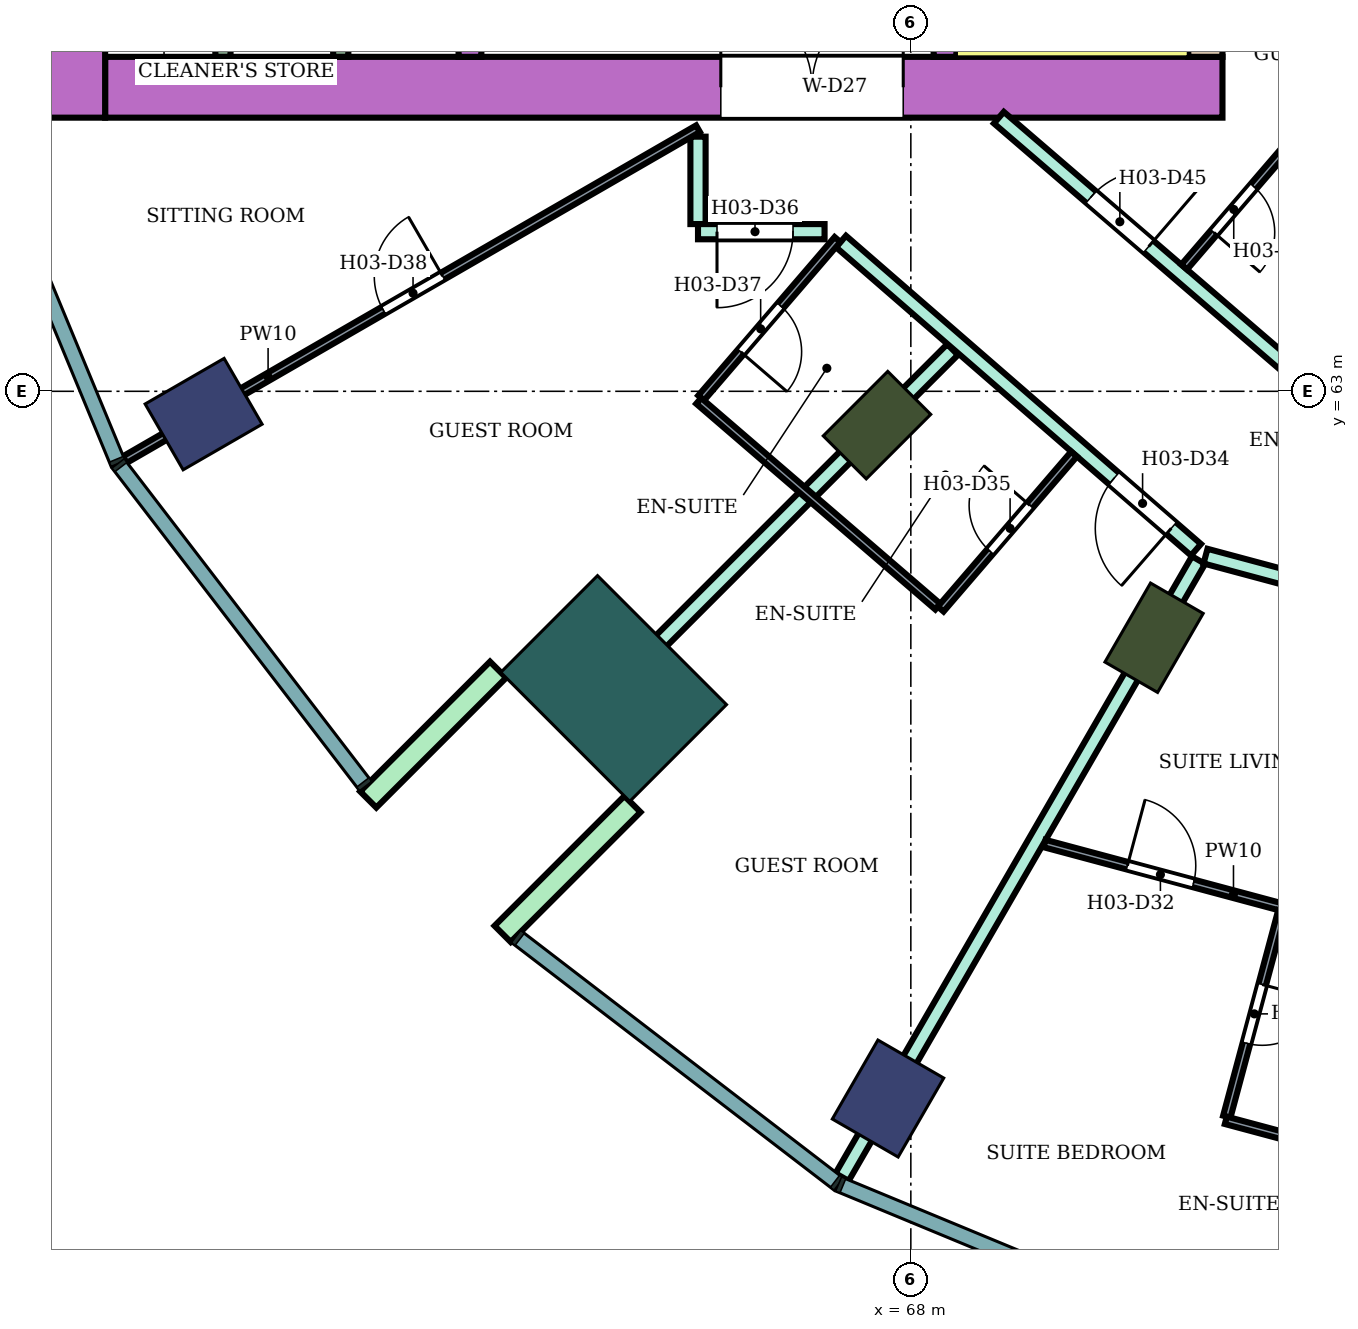
"""IFC4 building model, lengths in metres.
Left out: names, types, materials, properties, quantities, classifications, styles, units other than length and angle.
Written with IfcOpenShell. Run it as: python <this file> out.ifc"""

import sys

from ifc_helpers import new_model, si_unit, direction, frame, frame_2d, origin, origin_2d, place, context, subcontext, project, spatial, rectangle, extrude, element, fill, save


model = new_model("IFC4")
c1 = context("Model", 3, precision=1e-05, world=origin(), true_north=direction((0.0, 1.0)))
c2 = subcontext(c1, "Body", "Model", "MODEL_VIEW")
j1 = project(units=[si_unit("LENGTHUNIT", "METRE"), si_unit("PLANEANGLEUNIT", "RADIAN")], contexts=[c1])
p1 = place(None, origin())
s1 = spatial("IfcSite", under=j1, at=p1, CompositionType="ELEMENT")
p2 = place(p1, origin())
s2 = spatial("IfcBuilding", under=s1, at=p2, CompositionType="ELEMENT")
p3 = place(p2, frame((0.0, 0.0, 55.4)))
s3 = spatial("IfcBuildingStorey", under=s2, at=p3, CompositionType="ELEMENT", Elevation=55.4)
for number, where, z_axis, x_axis in (
    (1, (58.696, 62.7, 0.0), (0.0, 0.0, 1.0), (-0.866, -0.5, 0.0)),
    (2, (67.7, 53.696, 0.0), (0.0, 0.0, 1.0), (-0.5, -0.866, 0.0)),
):
    element("IfcColumn", number, at=place(p3, frame(where, z_axis=z_axis, x_axis=x_axis)), inside=s3, PredefinedType="COLUMN", context=c2, shape_type="SweptSolid", body=[
        extrude(rectangle(XDim=1.2, YDim=1.0, at=origin_2d()), origin(), (0.0, 0.0, 1.0), 3.8),
    ])
for number, where, z_axis, x_axis in (
    (3, (67.555, 62.555, 0.0), (0.0, 0.0, 1.0), (-0.707, -0.707, 0.0)),
    (4, (71.2, 59.758, 0.0), (0.0, 0.0, 1.0), (-0.5, -0.866, 0.0)),
):
    element("IfcColumn", number, at=place(p3, frame(where, z_axis=z_axis, x_axis=x_axis)), inside=s3, PredefinedType="COLUMN", context=c2, shape_type="SweptSolid", body=[
        extrude(rectangle(XDim=1.2, YDim=0.8, at=origin_2d()), origin(), (0.0, 0.0, 1.0), 3.8),
    ])
p4 = place(p3, frame((64.09, 59.09, 0.0), z_axis=(0.0, 0.0, 1.0), x_axis=(-0.707106781187, -0.707106781187, 0.0)))
e5 = element("IfcColumn", 5, at=p4, inside=s3, PredefinedType="COLUMN", context=c2, shape_type="SweptSolid", body=[
    extrude(rectangle(XDim=1.8, YDim=2.4, at=origin_2d()), origin(), (0.0, 0.0, 1.0), 3.8),
])
p5 = place(p3, frame((72.1, 67.0, 0.0), z_axis=(0.0, 0.0, 1.0), x_axis=(-1.0, 0.0, 0.0)))
e6 = element("IfcWall", 6, at=p5, inside=s3, PredefinedType="SHEAR", context=c2, shape_type="SweptSolid", body=[
    extrude(rectangle(XDim=14.7, YDim=0.8, at=frame_2d((7.35, 0.0))), origin(), (0.0, 0.0, 1.0), 3.48),
])
p6 = place(p5, frame((4.2, 0.0, 0.0)))
e7 = element("IfcOpeningElement", 7, at=p6, cuts=e6, PredefinedType="OPENING", context=c2, shape_type="SweptSolid", body=[
    extrude(rectangle(XDim=2.4, YDim=2.4, at=frame_2d((1.2, 1.2))), frame((0.0, 0.41, 0.0), z_axis=(0.0, -1.0, 0.0), x_axis=(1.0, 0.0, 0.0)), (0.0, 0.0, 1.0), 0.82),
])
p7 = place(p3, frame((71.875, 75.0, 0.0), z_axis=(0.0, 0.0, 1.0), x_axis=(0.0, -1.0, 0.0)))
e8 = element("IfcWall", 8, at=p7, inside=s3, PredefinedType="SHEAR", context=c2, shape_type="SweptSolid", body=[
    extrude(rectangle(XDim=7.6, YDim=0.45, at=frame_2d((3.8, 0.0))), origin(), (0.0, 0.0, 1.0), 3.48),
])
p8 = place(p3, frame((57.0, 83.4, 0.0), z_axis=(0.0, 0.0, 1.0), x_axis=(0.0, -1.0, 0.0)))
e9 = element("IfcWall", 9, at=p8, inside=s3, PredefinedType="SHEAR", context=c2, shape_type="SweptSolid", body=[
    extrude(rectangle(XDim=16.8, YDim=0.8, at=frame_2d((8.4, 0.0))), origin(), (0.0, 0.0, 1.0), 3.48),
])
p9 = place(p3, frame((68.45, 75.0, 0.0), z_axis=(0.0, 0.0, 1.0), x_axis=(0.0, -1.0, 0.0)))
e10 = element("IfcWall", 10, at=p9, inside=s3, PredefinedType="SHEAR", context=c2, shape_type="SweptSolid", body=[
    extrude(rectangle(XDim=7.6, YDim=0.3, at=frame_2d((3.8, 0.0))), origin(), (0.0, 0.0, 1.0), 3.48),
])
p10 = place(p9, frame((1.85, 0.0, 0.0)))
e11 = element("IfcOpeningElement", 11, at=p10, cuts=e10, PredefinedType="OPENING", context=c2, shape_type="SweptSolid", body=[
    extrude(rectangle(XDim=0.9, YDim=2.1, at=frame_2d((0.45, 1.05))), frame((0.0, 0.16, 0.0), z_axis=(0.0, -1.0, 0.0), x_axis=(1.0, 0.0, 0.0)), (0.0, 0.0, 1.0), 0.32),
])
p11 = place(p3, frame((62.2, 70.45, 0.0), z_axis=(0.0, 0.0, 1.0), x_axis=(0.0, -1.0, 0.0)))
e12 = element("IfcWall", 12, at=p11, inside=s3, PredefinedType="SHEAR", context=c2, shape_type="SweptSolid", body=[
    extrude(rectangle(XDim=3.05, YDim=0.3, at=frame_2d((1.525, 0.0))), origin(), (0.0, 0.0, 1.0), 3.48),
])
for number, where, z_axis, x_axis in (
    (13, (62.57, 59.338, 0.0), (0.0, 0.0, 1.0), (-0.707, -0.707, 0.0)),
    (14, (64.338, 57.57, 0.0), (0.0, 0.0, 1.0), (-0.707, -0.707, 0.0)),
):
    element("IfcWall", number, at=place(p3, frame(where, z_axis=z_axis, x_axis=x_axis)), inside=s3, PredefinedType="NOTDEFINED", context=c2, shape_type="SweptSolid", body=[
        extrude(rectangle(XDim=2.416, YDim=0.3, at=frame_2d((1.208, 0.0))), origin(), (0.0, 0.0, 1.0), 3.8),
    ])
p12 = place(p3, frame((63.596, 58.596, 0.0), z_axis=(0.0, 0.0, 1.0), x_axis=(0.707106781187, 0.707106781187, 0.0)))
e15 = element("IfcWall", 15, at=p12, inside=s3, PredefinedType="PARTITIONING", context=c2, shape_type="SweptSolid", body=[
    extrude(rectangle(XDim=7.005, YDim=0.2, at=frame_2d((3.503, 0.0))), origin(), (0.0, 0.0, 1.0), 3.35),
])
p13 = place(p3, frame((65.2, 65.2, 0.0), z_axis=(0.0, 0.0, 1.0), x_axis=(0.0, 1.0, 0.0)))
e16 = element("IfcWall", 16, at=p13, inside=s3, PredefinedType="PARTITIONING", context=c2, shape_type="SweptSolid", body=[
    extrude(rectangle(XDim=1.15, YDim=0.2, at=frame_2d((0.575, 0.0))), origin(), (0.0, 0.0, 1.0), 3.35),
])
p14 = place(p3, frame((65.2, 65.1, 0.0), z_axis=(0.0, 0.0, 1.0), x_axis=(1.0, 0.0, 0.0)))
e17 = element("IfcWall", 17, at=p14, inside=s3, PredefinedType="PARTITIONING", context=c2, shape_type="SweptSolid", body=[
    extrude(rectangle(XDim=1.665, YDim=0.2, at=frame_2d((0.833, 0.0))), origin(), (0.0, 0.0, 1.0), 3.35),
])
p15 = place(p14, frame((0.25, 0.0, 0.0)))
e18 = element("IfcOpeningElement", 18, at=p15, cuts=e17, PredefinedType="OPENING", context=c2, shape_type="SweptSolid", body=[
    extrude(rectangle(XDim=1.0, YDim=2.1, at=frame_2d((0.5, 1.05))), frame((0.0, 0.11, 0.0), z_axis=(0.0, -1.0, 0.0), x_axis=(1.0, 0.0, 0.0)), (0.0, 0.0, 1.0), 0.22),
])
p16 = place(p3, frame((67.081, 64.971, 0.0), z_axis=(0.0, 0.0, 1.0), x_axis=(0.755031061605, -0.65568902386, 0.0)))
e19 = element("IfcWall", 19, at=p16, inside=s3, PredefinedType="PARTITIONING", context=c2, shape_type="SweptSolid", body=[
    extrude(rectangle(XDim=6.186, YDim=0.2, at=frame_2d((3.093, 0.0))), origin(), (0.0, 0.0, 1.0), 3.35),
])
p17 = place(p16, frame((4.755, 0.0, 0.0)))
e20 = element("IfcOpeningElement", 20, at=p17, cuts=e19, PredefinedType="OPENING", context=c2, shape_type="SweptSolid", body=[
    extrude(rectangle(XDim=1.0, YDim=2.1, at=frame_2d((0.5, 1.05))), frame((0.0, 0.11, 0.0), z_axis=(0.0, -1.0, 0.0), x_axis=(1.0, 0.0, 0.0)), (0.0, 0.0, 1.0), 0.22),
])
p18 = place(p3, frame((67.095, 52.662, 0.0), z_axis=(0.0, 0.0, 1.0), x_axis=(0.500247659952, 0.865882370021, 0.0)))
e21 = element("IfcWall", 21, at=p18, inside=s3, PredefinedType="PARTITIONING", context=c2, shape_type="SweptSolid", body=[
    extrude(rectangle(XDim=9.375, YDim=0.2, at=frame_2d((4.688, 0.0))), origin(), (0.0, 0.0, 1.0), 3.35),
])
p19 = place(p3, frame((69.158, 66.6, 0.0), z_axis=(0.0, 0.0, 1.0), x_axis=(0.757976058094, -0.652282373943, 0.0)))
e22 = element("IfcWall", 22, at=p19, inside=s3, PredefinedType="PARTITIONING", context=c2, shape_type="SweptSolid", body=[
    extrude(rectangle(XDim=5.16, YDim=0.2, at=frame_2d((2.58, 0.0))), origin(), (0.0, 0.0, 1.0), 3.35),
])
p20 = place(p19, frame((1.6, 0.0, 0.0)))
e23 = element("IfcOpeningElement", 23, at=p20, cuts=e22, PredefinedType="OPENING", context=c2, shape_type="SweptSolid", body=[
    extrude(rectangle(XDim=1.0, YDim=2.1, at=frame_2d((0.5, 1.05))), frame((0.0, 0.11, 0.0), z_axis=(0.0, -1.0, 0.0), x_axis=(1.0, 0.0, 0.0)), (0.0, 0.0, 1.0), 0.22),
])
p21 = place(p3, frame((71.877, 60.831, 0.0), z_axis=(0.0, 0.0, 1.0), x_axis=(0.965852509869, -0.259092510851, 0.0)))
e24 = element("IfcWall", 24, at=p21, inside=s3, PredefinedType="PARTITIONING", context=c2, shape_type="SweptSolid", body=[
    extrude(rectangle(XDim=8.32, YDim=0.2, at=frame_2d((4.16, 0.0))), origin(), (0.0, 0.0, 1.0), 3.35),
])
p22 = place(p21, frame((6.86, 0.0, 0.0)))
e25 = element("IfcOpeningElement", 25, at=p22, cuts=e24, PredefinedType="OPENING", context=c2, shape_type="SweptSolid", body=[
    extrude(rectangle(XDim=1.0, YDim=2.1, at=frame_2d((0.5, 1.05))), frame((0.0, 0.11, 0.0), z_axis=(0.0, -1.0, 0.0), x_axis=(1.0, 0.0, 0.0)), (0.0, 0.0, 1.0), 0.22),
])
p23 = place(p21, frame((1.6, 0.0, 0.0)))
e26 = element("IfcOpeningElement", 26, at=p23, cuts=e24, PredefinedType="OPENING", context=c2, shape_type="SweptSolid", body=[
    extrude(rectangle(XDim=1.0, YDim=2.1, at=frame_2d((0.5, 1.05))), frame((0.0, 0.11, 0.0), z_axis=(0.0, -1.0, 0.0), x_axis=(1.0, 0.0, 0.0)), (0.0, 0.0, 1.0), 0.22),
])
p24 = place(p3, frame((57.659, 62.101, 0.0), z_axis=(0.0, 0.0, 1.0), x_axis=(0.86602264145, 0.500004784474, 0.0)))
e27 = element("IfcWall", 27, at=p24, inside=s3, PredefinedType="PARTITIONING", context=c2, shape_type="SweptSolid", body=[
    extrude(rectangle(XDim=8.708, YDim=0.1, at=frame_2d((4.354, 0.0))), origin(), (0.0, 0.0, 1.0), 3.35),
])
p25 = place(p24, frame((3.929, 0.0, 0.0)))
e28 = element("IfcOpeningElement", 28, at=p25, cuts=e27, PredefinedType="OPENING", context=c2, shape_type="SweptSolid", body=[
    extrude(rectangle(XDim=0.9, YDim=2.1, at=frame_2d((0.45, 1.05))), frame((0.0, 0.06, 0.0), z_axis=(0.0, -1.0, 0.0), x_axis=(1.0, 0.0, 0.0)), (0.0, 0.0, 1.0), 0.12),
])
p26 = place(p3, frame((65.242, 62.912, 0.0), z_axis=(0.0, 0.0, 1.0), x_axis=(0.652069888227, 0.758158862553, 0.0)))
e29 = element("IfcWall", 29, at=p26, inside=s3, PredefinedType="PARTITIONING", context=c2, shape_type="SweptSolid", body=[
    extrude(rectangle(XDim=2.75, YDim=0.1, at=frame_2d((1.375, 0.0))), origin(), (0.0, 0.0, 1.0), 3.35),
])
p27 = place(p26, frame((0.8, 0.0, 0.0)))
e30 = element("IfcOpeningElement", 30, at=p27, cuts=e29, PredefinedType="OPENING", context=c2, shape_type="SweptSolid", body=[
    extrude(rectangle(XDim=0.8, YDim=2.1, at=frame_2d((0.4, 1.05))), frame((0.0, 0.06, 0.0), z_axis=(0.0, -1.0, 0.0), x_axis=(1.0, 0.0, 0.0)), (0.0, 0.0, 1.0), 0.12),
])
p28 = place(p3, frame((65.209, 62.875, 0.0), z_axis=(0.0, 0.0, 1.0), x_axis=(0.757930378138, -0.652335451969, 0.0)))
e31 = element("IfcWall", 31, at=p28, inside=s3, PredefinedType="PARTITIONING", context=c2, shape_type="SweptSolid", body=[
    extrude(rectangle(XDim=4.15, YDim=0.1, at=frame_2d((2.075, 0.0))), origin(), (0.0, 0.0, 1.0), 3.35),
])
p29 = place(p3, frame((68.393, 60.135, 0.0), z_axis=(0.0, 0.0, 1.0), x_axis=(0.652061182569, 0.758166349944, 0.0)))
e32 = element("IfcWall", 32, at=p29, inside=s3, PredefinedType="PARTITIONING", context=c2, shape_type="SweptSolid", body=[
    extrude(rectangle(XDim=2.69, YDim=0.1, at=frame_2d((1.345, 0.0))), origin(), (0.0, 0.0, 1.0), 3.35),
])
p30 = place(p29, frame((1.0, 0.0, 0.0)))
e33 = element("IfcOpeningElement", 33, at=p30, cuts=e32, PredefinedType="OPENING", context=c2, shape_type="SweptSolid", body=[
    extrude(rectangle(XDim=0.8, YDim=2.1, at=frame_2d((0.4, 1.05))), frame((0.0, 0.06, 0.0), z_axis=(0.0, -1.0, 0.0), x_axis=(1.0, 0.0, 0.0)), (0.0, 0.0, 1.0), 0.12),
])
p31 = place(p3, frame((69.76, 57.051, 0.0), z_axis=(0.0, 0.0, 1.0), x_axis=(0.965880475586, -0.258988236958, 0.0)))
e34 = element("IfcWall", 34, at=p31, inside=s3, PredefinedType="PARTITIONING", context=c2, shape_type="SweptSolid", body=[
    extrude(rectangle(XDim=5.146, YDim=0.1, at=frame_2d((2.573, 0.0))), origin(), (0.0, 0.0, 1.0), 3.35),
])
p32 = place(p31, frame((1.128, 0.0, 0.0)))
e35 = element("IfcOpeningElement", 35, at=p32, cuts=e34, PredefinedType="OPENING", context=c2, shape_type="SweptSolid", body=[
    extrude(rectangle(XDim=0.9, YDim=2.1, at=frame_2d((0.45, 1.05))), frame((0.0, 0.06, 0.0), z_axis=(0.0, -1.0, 0.0), x_axis=(1.0, 0.0, 0.0)), (0.0, 0.0, 1.0), 0.12),
])
p33 = place(p3, frame((71.596, 64.635, 0.0), z_axis=(0.0, 0.0, 1.0), x_axis=(0.652285007511, 0.757973791748, 0.0)))
e36 = element("IfcWall", 36, at=p33, inside=s3, PredefinedType="PARTITIONING", context=c2, shape_type="SweptSolid", body=[
    extrude(rectangle(XDim=2.65, YDim=0.1, at=frame_2d((1.325, 0.0))), origin(), (0.0, 0.0, 1.0), 3.35),
])
p34 = place(p33, frame((0.6, 0.0, 0.0)))
e37 = element("IfcOpeningElement", 37, at=p34, cuts=e36, PredefinedType="OPENING", context=c2, shape_type="SweptSolid", body=[
    extrude(rectangle(XDim=0.8, YDim=2.1, at=frame_2d((0.4, 1.05))), frame((0.0, 0.06, 0.0), z_axis=(0.0, -1.0, 0.0), x_axis=(1.0, 0.0, 0.0)), (0.0, 0.0, 1.0), 0.12),
])
p35 = place(p3, frame((72.157, 53.457, 0.0), z_axis=(0.0, 0.0, 1.0), x_axis=(0.258975798317, 0.965883810759, 0.0)))
e38 = element("IfcWall", 38, at=p35, inside=s3, PredefinedType="PARTITIONING", context=c2, shape_type="SweptSolid", body=[
    extrude(rectangle(XDim=2.8, YDim=0.1, at=frame_2d((1.4, 0.0))), origin(), (0.0, 0.0, 1.0), 3.35),
])
p36 = place(p35, frame((1.0, 0.0, 0.0)))
e39 = element("IfcOpeningElement", 39, at=p36, cuts=e38, PredefinedType="OPENING", context=c2, shape_type="SweptSolid", body=[
    extrude(rectangle(XDim=0.8, YDim=2.1, at=frame_2d((0.4, 1.05))), frame((0.0, 0.06, 0.0), z_axis=(0.0, -1.0, 0.0), x_axis=(1.0, 0.0, 0.0)), (0.0, 0.0, 1.0), 0.12),
])
p37 = place(p3, frame((72.144, 53.409, 0.0), z_axis=(0.0, 0.0, 1.0), x_axis=(0.965907902023, -0.258885930111, 0.0)))
e40 = element("IfcWall", 40, at=p37, inside=s3, PredefinedType="PARTITIONING", context=c2, shape_type="SweptSolid", body=[
    extrude(rectangle(XDim=1.9, YDim=0.1, at=frame_2d((0.95, 0.0))), origin(), (0.0, 0.0, 1.0), 3.35),
])
for number, where, z_axis, x_axis in (
    (41, (60.5, 70.15, 0.0), (0.0, 0.0, 1.0), (0.0, -1.0, 0.0)),
    (42, (58.95, 70.15, 0.0), (0.0, 0.0, 1.0), (0.0, -1.0, 0.0)),
):
    element("IfcWall", number, at=place(p3, frame(where, z_axis=z_axis, x_axis=x_axis)), inside=s3, PredefinedType="PARTITIONING", context=c2, shape_type="SweptSolid", body=[
        extrude(rectangle(XDim=2.75, YDim=0.2, at=frame_2d((1.375, 0.0))), origin(), (0.0, 0.0, 1.0), 3.48),
    ])
p38 = place(p32, origin())
e43 = element("IfcDoor", 43, at=p38, inside=s3, OperationType="SINGLE_SWING_LEFT", PredefinedType="DOOR", context=c2, shape_type="SweptSolid", body=[
    extrude(rectangle(XDim=0.9, YDim=2.1, at=frame_2d((0.45, 1.05))), frame((0.0, 0.025, 0.0), z_axis=(0.0, -1.0, 0.0), x_axis=(1.0, 0.0, 0.0)), (0.0, 0.0, 1.0), 0.05),
])
fill(e35, e43)
p39 = place(p36, frame((0.8, 0.0, 0.0), z_axis=(0.0, 0.0, 1.0), x_axis=(-1.0, 0.0, 0.0)))
e44 = element("IfcDoor", 44, at=p39, inside=s3, OperationType="SINGLE_SWING_LEFT", PredefinedType="DOOR", context=c2, shape_type="SweptSolid", body=[
    extrude(rectangle(XDim=0.8, YDim=2.1, at=frame_2d((0.4, 1.05))), frame((0.0, 0.025, 0.0), z_axis=(0.0, -1.0, 0.0), x_axis=(1.0, 0.0, 0.0)), (0.0, 0.0, 1.0), 0.05),
])
fill(e39, e44)
p40 = place(p17, frame((1.0, 0.0, 0.0), z_axis=(0.0, 0.0, 1.0), x_axis=(-1.0, 0.0, 0.0)))
e45 = element("IfcDoor", 45, at=p40, inside=s3, OperationType="SINGLE_SWING_LEFT", PredefinedType="DOOR", context=c2, shape_type="SweptSolid", body=[
    extrude(rectangle(XDim=1.0, YDim=2.1, at=frame_2d((0.5, 1.05))), frame((0.0, 0.025, 0.0), z_axis=(0.0, -1.0, 0.0), x_axis=(1.0, 0.0, 0.0)), (0.0, 0.0, 1.0), 0.05),
])
fill(e20, e45)
p41 = place(p30, origin())
e46 = element("IfcDoor", 46, at=p41, inside=s3, OperationType="SINGLE_SWING_RIGHT", PredefinedType="DOOR", context=c2, shape_type="SweptSolid", body=[
    extrude(rectangle(XDim=0.8, YDim=2.1, at=frame_2d((0.4, 1.05))), frame((0.0, 0.025, 0.0), z_axis=(0.0, -1.0, 0.0), x_axis=(1.0, 0.0, 0.0)), (0.0, 0.0, 1.0), 0.05),
])
fill(e33, e46)
p42 = place(p15, frame((1.0, 0.0, 0.0), z_axis=(0.0, 0.0, 1.0), x_axis=(-1.0, 0.0, 0.0)))
e47 = element("IfcDoor", 47, at=p42, inside=s3, OperationType="SINGLE_SWING_RIGHT", PredefinedType="DOOR", context=c2, shape_type="SweptSolid", body=[
    extrude(rectangle(XDim=1.0, YDim=2.1, at=frame_2d((0.5, 1.05))), frame((0.0, 0.025, 0.0), z_axis=(0.0, -1.0, 0.0), x_axis=(1.0, 0.0, 0.0)), (0.0, 0.0, 1.0), 0.05),
])
fill(e18, e47)
p43 = place(p27, frame((0.8, 0.0, 0.0), z_axis=(0.0, 0.0, 1.0), x_axis=(-1.0, 0.0, 0.0)))
e48 = element("IfcDoor", 48, at=p43, inside=s3, OperationType="SINGLE_SWING_RIGHT", PredefinedType="DOOR", context=c2, shape_type="SweptSolid", body=[
    extrude(rectangle(XDim=0.8, YDim=2.1, at=frame_2d((0.4, 1.05))), frame((0.0, 0.025, 0.0), z_axis=(0.0, -1.0, 0.0), x_axis=(1.0, 0.0, 0.0)), (0.0, 0.0, 1.0), 0.05),
])
fill(e30, e48)
p44 = place(p25, origin())
e49 = element("IfcDoor", 49, at=p44, inside=s3, OperationType="SINGLE_SWING_RIGHT", PredefinedType="DOOR", context=c2, shape_type="SweptSolid", body=[
    extrude(rectangle(XDim=0.9, YDim=2.1, at=frame_2d((0.45, 1.05))), frame((0.0, 0.025, 0.0), z_axis=(0.0, -1.0, 0.0), x_axis=(1.0, 0.0, 0.0)), (0.0, 0.0, 1.0), 0.05),
])
fill(e28, e49)
p45 = place(p20, origin())
e50 = element("IfcDoor", 50, at=p45, inside=s3, OperationType="SINGLE_SWING_RIGHT", PredefinedType="DOOR", context=c2, shape_type="SweptSolid", body=[
    extrude(rectangle(XDim=1.0, YDim=2.1, at=frame_2d((0.5, 1.05))), frame((0.0, 0.025, 0.0), z_axis=(0.0, -1.0, 0.0), x_axis=(1.0, 0.0, 0.0)), (0.0, 0.0, 1.0), 0.05),
])
fill(e23, e50)
p46 = place(p34, frame((0.8, 0.0, 0.0), z_axis=(0.0, 0.0, 1.0), x_axis=(-1.0, 0.0, 0.0)))
e51 = element("IfcDoor", 51, at=p46, inside=s3, OperationType="SINGLE_SWING_RIGHT", PredefinedType="DOOR", context=c2, shape_type="SweptSolid", body=[
    extrude(rectangle(XDim=0.8, YDim=2.1, at=frame_2d((0.4, 1.05))), frame((0.0, 0.025, 0.0), z_axis=(0.0, -1.0, 0.0), x_axis=(1.0, 0.0, 0.0)), (0.0, 0.0, 1.0), 0.05),
])
fill(e37, e51)
p47 = place(p6, frame((2.4, 0.0, 0.0), z_axis=(0.0, 0.0, 1.0), x_axis=(-1.0, 0.0, 0.0)))
e52 = element("IfcDoor", 52, at=p47, inside=s3, OperationType="DOUBLE_DOOR_SINGLE_SWING", PredefinedType="DOOR", context=c2, shape_type="SweptSolid", body=[
    extrude(rectangle(XDim=2.4, YDim=2.4, at=frame_2d((1.2, 1.2))), frame((0.0, 0.025, 0.0), z_axis=(0.0, -1.0, 0.0), x_axis=(1.0, 0.0, 0.0)), (0.0, 0.0, 1.0), 0.05),
])
fill(e7, e52)
save(model, sys.argv[1])
